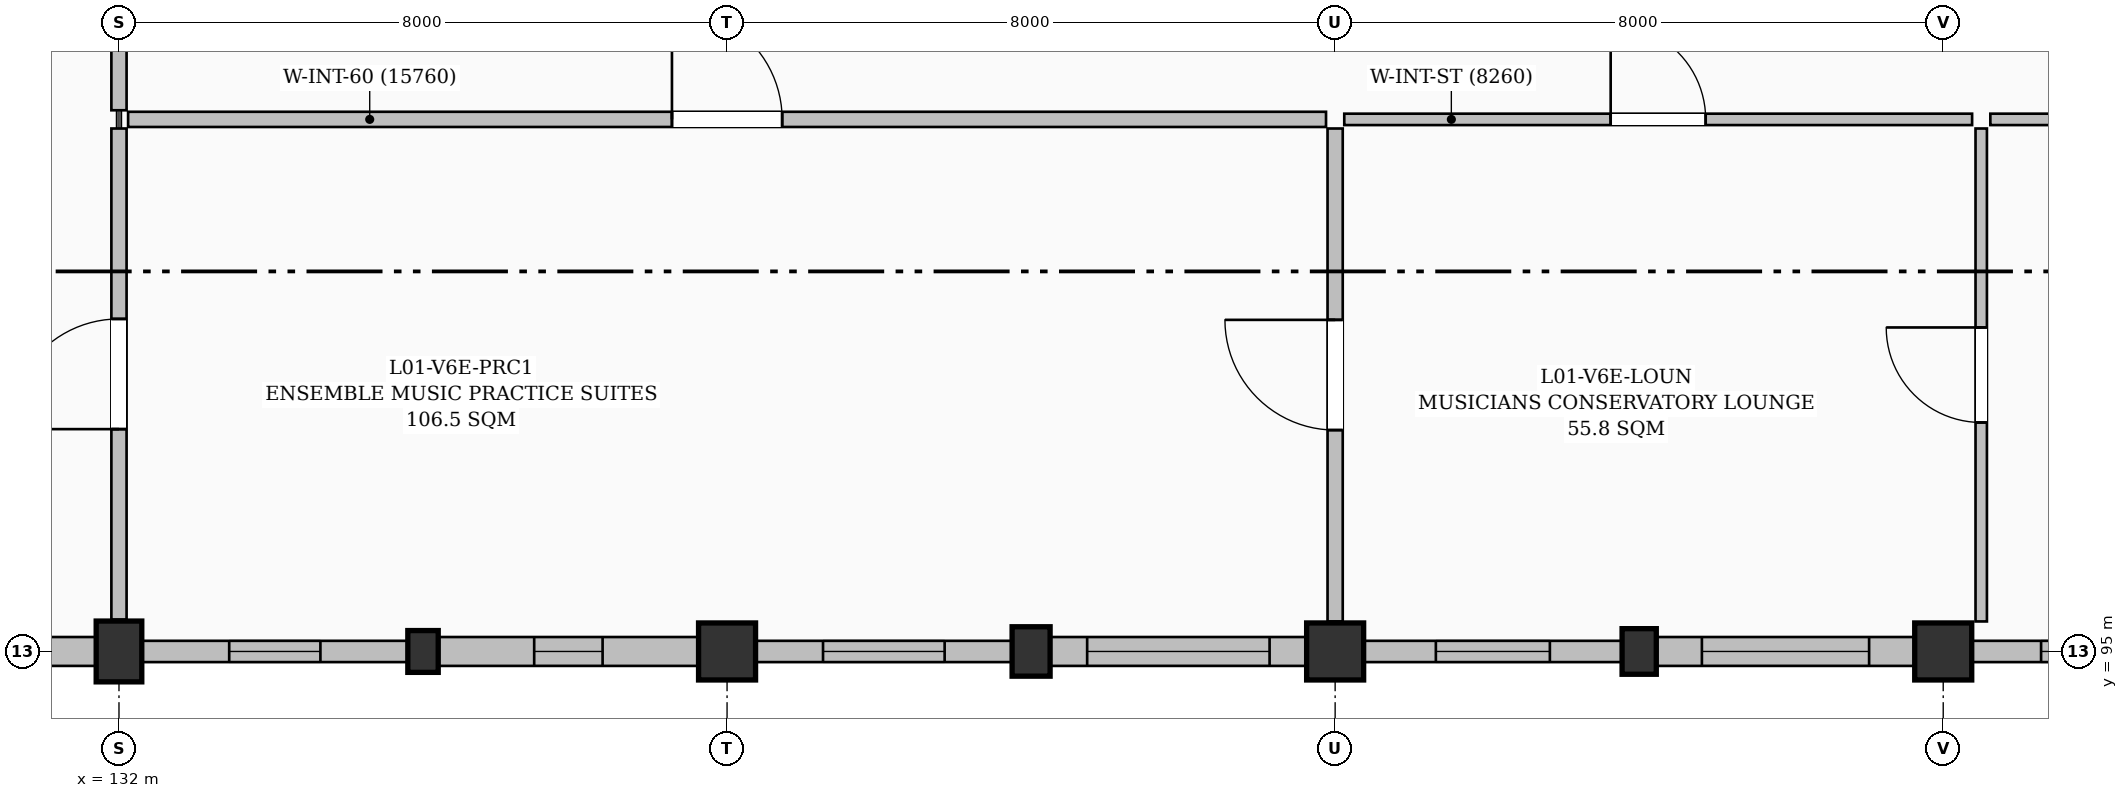
"""IFC4 building model, lengths in metres.
Left out: names, types, materials, properties, quantities, classifications, styles, units other than length and angle.
Written with IfcOpenShell. Run it as: python <this file> out.ifc"""

import sys

from ifc_helpers import new_model, si_unit, direction, frame, frame_2d, origin, origin_2d, place, context, subcontext, project, spatial, rectangle, extrude, element, fill, save


model = new_model("IFC4")
c1 = context("Model", 3, precision=1e-05, world=origin(), true_north=direction((0.0, 1.0)))
c2 = subcontext(c1, "Body", "Model", "MODEL_VIEW")
j1 = project(units=[si_unit("LENGTHUNIT", "METRE"), si_unit("PLANEANGLEUNIT", "RADIAN")], contexts=[c1])
p1 = place(None, origin())
s1 = spatial("IfcSite", under=j1, at=p1, CompositionType="ELEMENT")
p2 = place(p1, origin())
s2 = spatial("IfcBuilding", under=s1, at=p2, CompositionType="ELEMENT")
p3 = place(p2, frame((0.0, 0.0, 4.8)))
s3 = spatial("IfcBuildingStorey", under=s2, at=p3, CompositionType="ELEMENT", Elevation=4.8)
p4 = place(p3, frame((132.0, 95.0, 0.0), z_axis=(0.0, 0.0, 1.0), x_axis=(1.0, 0.0, 0.0)))
e1 = element("IfcColumn", 1, at=p4, inside=s3, PredefinedType="COLUMN", context=c2, shape_type="SweptSolid", body=[
    extrude(rectangle(XDim=0.6, YDim=0.8, at=origin_2d()), origin(), (0.0, 0.0, 1.0), 4.5),
])
p5 = place(p3, frame((136.0, 95.0, 0.0), z_axis=(0.0, 0.0, 1.0), x_axis=(1.0, 0.0, 0.0)))
e2 = element("IfcColumn", 2, at=p5, inside=s3, PredefinedType="PILASTER", context=c2, shape_type="SweptSolid", body=[
    extrude(rectangle(XDim=0.4, YDim=0.55, at=origin_2d()), origin(), (0.0, 0.0, 1.0), 4.5),
])
p6 = place(p3, frame((140.0, 95.0, 0.0), z_axis=(0.0, 0.0, 1.0), x_axis=(1.0, 0.0, 0.0)))
e3 = element("IfcColumn", 3, at=p6, inside=s3, PredefinedType="COLUMN", context=c2, shape_type="SweptSolid", body=[
    extrude(rectangle(XDim=0.75, YDim=0.75, at=origin_2d()), origin(), (0.0, 0.0, 1.0), 4.5),
])
p7 = place(p3, frame((144.0, 95.0, 0.0), z_axis=(0.0, 0.0, 1.0), x_axis=(1.0, 0.0, 0.0)))
e4 = element("IfcColumn", 4, at=p7, inside=s3, PredefinedType="PILASTER", context=c2, shape_type="SweptSolid", body=[
    extrude(rectangle(XDim=0.5, YDim=0.65, at=origin_2d()), origin(), (0.0, 0.0, 1.0), 4.5),
])
p8 = place(p3, frame((148.0, 95.0, 0.0), z_axis=(0.0, 0.0, 1.0), x_axis=(1.0, 0.0, 0.0)))
e5 = element("IfcColumn", 5, at=p8, inside=s3, PredefinedType="COLUMN", context=c2, shape_type="SweptSolid", body=[
    extrude(rectangle(XDim=0.75, YDim=0.75, at=origin_2d()), origin(), (0.0, 0.0, 1.0), 4.5),
])
p9 = place(p3, frame((152.0, 95.0, 0.0), z_axis=(0.0, 0.0, 1.0), x_axis=(1.0, 0.0, 0.0)))
e6 = element("IfcColumn", 6, at=p9, inside=s3, PredefinedType="PILASTER", context=c2, shape_type="SweptSolid", body=[
    extrude(rectangle(XDim=0.45, YDim=0.6, at=origin_2d()), origin(), (0.0, 0.0, 1.0), 4.5),
])
p10 = place(p3, frame((156.0, 95.0, 0.0), z_axis=(0.0, 0.0, 1.0), x_axis=(1.0, 0.0, 0.0)))
e7 = element("IfcColumn", 7, at=p10, inside=s3, PredefinedType="COLUMN", context=c2, shape_type="SweptSolid", body=[
    extrude(rectangle(XDim=0.75, YDim=0.75, at=origin_2d()), origin(), (0.0, 0.0, 1.0), 4.5),
])
p11 = place(p3, frame((159.8, 95.0, 0.0), z_axis=(0.0, 0.0, 1.0), x_axis=(-1.0, 0.0, 0.0)))
e8 = element("IfcWall", 8, at=p11, inside=s3, PredefinedType="SOLIDWALL", context=c2, shape_type="SweptSolid", body=[
    extrude(rectangle(XDim=3.425, YDim=0.28, at=frame_2d((1.712, 0.0))), origin(), (0.0, 0.0, 1.0), 3.685),
])
p12 = place(p11, frame((0.913, 0.0, 0.95)))
e9 = element("IfcOpeningElement", 9, at=p12, cuts=e8, PredefinedType="OPENING", context=c2, shape_type="SweptSolid", body=[
    extrude(rectangle(XDim=1.6, YDim=1.8, at=frame_2d((0.8, 0.9))), frame((0.0, 0.15, 0.0), z_axis=(0.0, -1.0, 0.0), x_axis=(1.0, 0.0, 0.0)), (0.0, 0.0, 1.0), 0.3),
])
p13 = place(p3, frame((155.625, 95.0, 0.0), z_axis=(0.0, 0.0, 1.0), x_axis=(-1.0, 0.0, 0.0)))
e10 = element("IfcWall", 10, at=p13, inside=s3, PredefinedType="SOLIDWALL", context=c2, shape_type="SweptSolid", body=[
    extrude(rectangle(XDim=3.4, YDim=0.38, at=frame_2d((1.7, 0.0))), origin(), (0.0, 0.0, 1.0), 3.735),
])
p14 = place(p13, frame((0.6, 0.0, 0.95)))
e11 = element("IfcOpeningElement", 11, at=p14, cuts=e10, PredefinedType="OPENING", context=c2, shape_type="SweptSolid", body=[
    extrude(rectangle(XDim=2.2, YDim=1.8, at=frame_2d((1.1, 0.9))), frame((0.0, 0.2, 0.0), z_axis=(0.0, -1.0, 0.0), x_axis=(1.0, 0.0, 0.0)), (0.0, 0.0, 1.0), 0.4),
])
p15 = place(p3, frame((151.775, 95.0, 0.0), z_axis=(0.0, 0.0, 1.0), x_axis=(-1.0, 0.0, 0.0)))
e12 = element("IfcWall", 12, at=p15, inside=s3, PredefinedType="SOLIDWALL", context=c2, shape_type="SweptSolid", body=[
    extrude(rectangle(XDim=3.4, YDim=0.28, at=frame_2d((1.7, 0.0))), origin(), (0.0, 0.0, 1.0), 3.735),
])
p16 = place(p15, frame((0.95, 0.0, 0.95)))
e13 = element("IfcOpeningElement", 13, at=p16, cuts=e12, PredefinedType="OPENING", context=c2, shape_type="SweptSolid", body=[
    extrude(rectangle(XDim=1.5, YDim=1.5, at=frame_2d((0.75, 0.75))), frame((0.0, 0.15, 0.0), z_axis=(0.0, -1.0, 0.0), x_axis=(1.0, 0.0, 0.0)), (0.0, 0.0, 1.0), 0.3),
])
p17 = place(p3, frame((147.625, 95.0, 0.0), z_axis=(0.0, 0.0, 1.0), x_axis=(-1.0, 0.0, 0.0)))
e14 = element("IfcWall", 14, at=p17, inside=s3, PredefinedType="SOLIDWALL", context=c2, shape_type="SweptSolid", body=[
    extrude(rectangle(XDim=3.375, YDim=0.38, at=frame_2d((1.688, 0.0))), origin(), (0.0, 0.0, 1.0), 3.935),
])
p18 = place(p17, frame((0.488, 0.0, 0.95)))
e15 = element("IfcOpeningElement", 15, at=p18, cuts=e14, PredefinedType="OPENING", context=c2, shape_type="SweptSolid", body=[
    extrude(rectangle(XDim=2.4, YDim=1.5, at=frame_2d((1.2, 0.75))), frame((0.0, 0.2, 0.0), z_axis=(0.0, -1.0, 0.0), x_axis=(1.0, 0.0, 0.0)), (0.0, 0.0, 1.0), 0.4),
])
p19 = place(p3, frame((143.75, 95.0, 0.0), z_axis=(0.0, 0.0, 1.0), x_axis=(-1.0, 0.0, 0.0)))
e16 = element("IfcWall", 16, at=p19, inside=s3, PredefinedType="SOLIDWALL", context=c2, shape_type="SweptSolid", body=[
    extrude(rectangle(XDim=3.375, YDim=0.28, at=frame_2d((1.688, 0.0))), origin(), (0.0, 0.0, 1.0), 3.935),
])
p20 = place(p19, frame((0.887, 0.0, 0.95)))
e17 = element("IfcOpeningElement", 17, at=p20, cuts=e16, PredefinedType="OPENING", context=c2, shape_type="SweptSolid", body=[
    extrude(rectangle(XDim=1.6, YDim=1.2, at=frame_2d((0.8, 0.6))), frame((0.0, 0.15, 0.0), z_axis=(0.0, -1.0, 0.0), x_axis=(1.0, 0.0, 0.0)), (0.0, 0.0, 1.0), 0.3),
])
p21 = place(p3, frame((139.625, 95.0, 0.0), z_axis=(0.0, 0.0, 1.0), x_axis=(-1.0, 0.0, 0.0)))
e18 = element("IfcWall", 18, at=p21, inside=s3, PredefinedType="SOLIDWALL", context=c2, shape_type="SweptSolid", body=[
    extrude(rectangle(XDim=3.425, YDim=0.38, at=frame_2d((1.712, 0.0))), origin(), (0.0, 0.0, 1.0), 3.635),
])
p22 = place(p21, frame((1.262, 0.0, 0.95)))
e19 = element("IfcOpeningElement", 19, at=p22, cuts=e18, PredefinedType="OPENING", context=c2, shape_type="SweptSolid", body=[
    extrude(rectangle(XDim=0.9, YDim=1.8, at=frame_2d((0.45, 0.9))), frame((0.0, 0.2, 0.0), z_axis=(0.0, -1.0, 0.0), x_axis=(1.0, 0.0, 0.0)), (0.0, 0.0, 1.0), 0.4),
])
p23 = place(p3, frame((135.8, 95.0, 0.0), z_axis=(0.0, 0.0, 1.0), x_axis=(-1.0, 0.0, 0.0)))
e20 = element("IfcWall", 20, at=p23, inside=s3, PredefinedType="SOLIDWALL", context=c2, shape_type="SweptSolid", body=[
    extrude(rectangle(XDim=3.5, YDim=0.28, at=frame_2d((1.75, 0.0))), origin(), (0.0, 0.0, 1.0), 3.635),
])
p24 = place(p23, frame((1.15, 0.0, 0.95)))
e21 = element("IfcOpeningElement", 21, at=p24, cuts=e20, PredefinedType="OPENING", context=c2, shape_type="SweptSolid", body=[
    extrude(rectangle(XDim=1.2, YDim=1.8, at=frame_2d((0.6, 0.9))), frame((0.0, 0.15, 0.0), z_axis=(0.0, -1.0, 0.0), x_axis=(1.0, 0.0, 0.0)), (0.0, 0.0, 1.0), 0.3),
])
p25 = place(p3, frame((131.7, 95.0, 0.0), z_axis=(0.0, 0.0, 1.0), x_axis=(-1.0, 0.0, 0.0)))
e22 = element("IfcWall", 22, at=p25, inside=s3, PredefinedType="SOLIDWALL", context=c2, shape_type="SweptSolid", body=[
    extrude(rectangle(XDim=3.475, YDim=0.38, at=frame_2d((1.737, 0.0))), origin(), (0.0, 0.0, 1.0), 3.685),
])
p26 = place(p25, frame((0.837, 0.0, 0.95)))
e23 = element("IfcOpeningElement", 23, at=p26, cuts=e22, PredefinedType="OPENING", context=c2, shape_type="SweptSolid", body=[
    extrude(rectangle(XDim=1.8, YDim=1.8, at=frame_2d((0.9, 0.9))), frame((0.0, 0.2, 0.0), z_axis=(0.0, -1.0, 0.0), x_axis=(1.0, 0.0, 0.0)), (0.0, 0.0, 1.0), 0.4),
])
p27 = place(p3, frame((132.0, 95.42, 0.0), z_axis=(0.0, 0.0, 1.0), x_axis=(0.0, 1.0, 0.0)))
e24 = element("IfcWall", 24, at=p27, inside=s3, PredefinedType="PARTITIONING", context=c2, shape_type="SweptSolid", body=[
    extrude(rectangle(XDim=6.46, YDim=0.2, at=frame_2d((3.23, 0.0))), origin(), (0.0, 0.0, 1.0), 3.785),
])
p28 = place(p27, frame((2.505, 0.0, 0.0)))
e25 = element("IfcOpeningElement", 25, at=p28, cuts=e24, PredefinedType="OPENING", context=c2, shape_type="SweptSolid", body=[
    extrude(rectangle(XDim=1.45, YDim=2.25, at=frame_2d((0.725, 1.125))), frame((0.0, 0.11, 0.0), z_axis=(0.0, -1.0, 0.0), x_axis=(1.0, 0.0, 0.0)), (0.0, 0.0, 1.0), 0.22),
])
p29 = place(p3, frame((132.0, 102.12, 0.0), z_axis=(0.0, 0.0, 1.0), x_axis=(0.0, 1.0, 0.0)))
e26 = element("IfcWall", 26, at=p29, inside=s3, PredefinedType="PARTITIONING", context=c2, shape_type="SweptSolid", body=[
    extrude(rectangle(XDim=2.36, YDim=0.2, at=frame_2d((1.18, 0.0))), origin(), (0.0, 0.0, 1.0), 3.785),
])
p30 = place(p3, frame((132.12, 102.0, 0.0), z_axis=(0.0, 0.0, 1.0), x_axis=(1.0, 0.0, 0.0)))
e27 = element("IfcWall", 27, at=p30, inside=s3, PredefinedType="PARTITIONING", context=c2, shape_type="SweptSolid", body=[
    extrude(rectangle(XDim=15.76, YDim=0.2, at=frame_2d((7.88, 0.0))), origin(), (0.0, 0.0, 1.0), 3.875),
])
p31 = place(p30, frame((7.155, 0.0, 0.0)))
e28 = element("IfcOpeningElement", 28, at=p31, cuts=e27, PredefinedType="OPENING", context=c2, shape_type="SweptSolid", body=[
    extrude(rectangle(XDim=1.45, YDim=2.25, at=frame_2d((0.725, 1.125))), frame((0.0, 0.11, 0.0), z_axis=(0.0, -1.0, 0.0), x_axis=(1.0, 0.0, 0.0)), (0.0, 0.0, 1.0), 0.22),
])
p32 = place(p3, frame((148.0, 95.395, 0.0), z_axis=(0.0, 0.0, 1.0), x_axis=(0.0, 1.0, 0.0)))
e29 = element("IfcWall", 29, at=p32, inside=s3, PredefinedType="PARTITIONING", context=c2, shape_type="SweptSolid", body=[
    extrude(rectangle(XDim=6.485, YDim=0.2, at=frame_2d((3.242, 0.0))), origin(), (0.0, 0.0, 1.0), 3.385),
])
p33 = place(p32, frame((2.518, 0.0, 0.0)))
e30 = element("IfcOpeningElement", 30, at=p33, cuts=e29, PredefinedType="OPENING", context=c2, shape_type="SweptSolid", body=[
    extrude(rectangle(XDim=1.45, YDim=2.25, at=frame_2d((0.725, 1.125))), frame((0.0, 0.11, 0.0), z_axis=(0.0, -1.0, 0.0), x_axis=(1.0, 0.0, 0.0)), (0.0, 0.0, 1.0), 0.22),
])
p34 = place(p3, frame((156.62, 102.0, 0.0), z_axis=(0.0, 0.0, 1.0), x_axis=(1.0, 0.0, 0.0)))
e31 = element("IfcWall", 31, at=p34, inside=s3, PredefinedType="PARTITIONING", context=c2, shape_type="SweptSolid", body=[
    extrude(rectangle(XDim=7.26, YDim=0.15, at=frame_2d((3.63, 0.0))), origin(), (0.0, 0.0, 1.0), 3.905),
])
p35 = place(p34, frame((3.005, 0.0, 0.0)))
e32 = element("IfcOpeningElement", 32, at=p35, cuts=e31, PredefinedType="OPENING", context=c2, shape_type="SweptSolid", body=[
    extrude(rectangle(XDim=1.25, YDim=2.15, at=frame_2d((0.625, 1.075))), frame((0.0, 0.085, 0.0), z_axis=(0.0, -1.0, 0.0), x_axis=(1.0, 0.0, 0.0)), (0.0, 0.0, 1.0), 0.17),
])
p36 = place(p3, frame((156.5, 95.395, 0.0), z_axis=(0.0, 0.0, 1.0), x_axis=(0.0, 1.0, 0.0)))
e33 = element("IfcWall", 33, at=p36, inside=s3, PredefinedType="PARTITIONING", context=c2, shape_type="SweptSolid", body=[
    extrude(rectangle(XDim=6.485, YDim=0.15, at=frame_2d((3.242, 0.0))), origin(), (0.0, 0.0, 1.0), 4.25),
])
p37 = place(p36, frame((2.617, 0.0, 0.0)))
e34 = element("IfcOpeningElement", 34, at=p37, cuts=e33, PredefinedType="OPENING", context=c2, shape_type="SweptSolid", body=[
    extrude(rectangle(XDim=1.25, YDim=2.15, at=frame_2d((0.625, 1.075))), frame((0.0, 0.085, 0.0), z_axis=(0.0, -1.0, 0.0), x_axis=(1.0, 0.0, 0.0)), (0.0, 0.0, 1.0), 0.17),
])
p38 = place(p3, frame((148.12, 102.0, 0.0), z_axis=(0.0, 0.0, 1.0), x_axis=(1.0, 0.0, 0.0)))
e35 = element("IfcWall", 35, at=p38, inside=s3, PredefinedType="PARTITIONING", context=c2, shape_type="SweptSolid", body=[
    extrude(rectangle(XDim=8.26, YDim=0.15, at=frame_2d((4.13, 0.0))), origin(), (0.0, 0.0, 1.0), 3.995),
])
p39 = place(p38, frame((3.505, 0.0, 0.0)))
e36 = element("IfcOpeningElement", 36, at=p39, cuts=e35, PredefinedType="OPENING", context=c2, shape_type="SweptSolid", body=[
    extrude(rectangle(XDim=1.25, YDim=2.15, at=frame_2d((0.625, 1.075))), frame((0.0, 0.085, 0.0), z_axis=(0.0, -1.0, 0.0), x_axis=(1.0, 0.0, 0.0)), (0.0, 0.0, 1.0), 0.17),
])
p40 = place(p12, origin())
e37 = element("IfcWindow", 37, at=p40, inside=s3, PartitioningType="DOUBLE_PANEL_VERTICAL", PredefinedType="WINDOW", context=c2, shape_type="SweptSolid", body=[
    extrude(rectangle(XDim=1.6, YDim=1.8, at=frame_2d((0.8, 0.9))), frame((0.0, 0.03, 0.0), z_axis=(0.0, -1.0, 0.0), x_axis=(1.0, 0.0, 0.0)), (0.0, 0.0, 1.0), 0.06),
])
fill(e9, e37)
p41 = place(p14, origin())
e38 = element("IfcWindow", 38, at=p41, inside=s3, PartitioningType="TRIPLE_PANEL_VERTICAL", PredefinedType="WINDOW", context=c2, shape_type="SweptSolid", body=[
    extrude(rectangle(XDim=2.2, YDim=1.8, at=frame_2d((1.1, 0.9))), frame((0.0, 0.03, 0.0), z_axis=(0.0, -1.0, 0.0), x_axis=(1.0, 0.0, 0.0)), (0.0, 0.0, 1.0), 0.06),
])
fill(e11, e38)
p42 = place(p16, origin())
e39 = element("IfcWindow", 39, at=p42, inside=s3, PartitioningType="DOUBLE_PANEL_VERTICAL", PredefinedType="WINDOW", context=c2, shape_type="SweptSolid", body=[
    extrude(rectangle(XDim=1.5, YDim=1.5, at=frame_2d((0.75, 0.75))), frame((0.0, 0.03, 0.0), z_axis=(0.0, -1.0, 0.0), x_axis=(1.0, 0.0, 0.0)), (0.0, 0.0, 1.0), 0.06),
])
fill(e13, e39)
p43 = place(p18, origin())
e40 = element("IfcWindow", 40, at=p43, inside=s3, PartitioningType="TRIPLE_PANEL_VERTICAL", PredefinedType="WINDOW", context=c2, shape_type="SweptSolid", body=[
    extrude(rectangle(XDim=2.4, YDim=1.5, at=frame_2d((1.2, 0.75))), frame((0.0, 0.03, 0.0), z_axis=(0.0, -1.0, 0.0), x_axis=(1.0, 0.0, 0.0)), (0.0, 0.0, 1.0), 0.06),
])
fill(e15, e40)
p44 = place(p20, origin())
e41 = element("IfcWindow", 41, at=p44, inside=s3, PartitioningType="DOUBLE_PANEL_HORIZONTAL", PredefinedType="WINDOW", context=c2, shape_type="SweptSolid", body=[
    extrude(rectangle(XDim=1.6, YDim=1.2, at=frame_2d((0.8, 0.6))), frame((0.0, 0.03, 0.0), z_axis=(0.0, -1.0, 0.0), x_axis=(1.0, 0.0, 0.0)), (0.0, 0.0, 1.0), 0.06),
])
fill(e17, e41)
p45 = place(p22, origin())
e42 = element("IfcWindow", 42, at=p45, inside=s3, PartitioningType="SINGLE_PANEL", PredefinedType="WINDOW", context=c2, shape_type="SweptSolid", body=[
    extrude(rectangle(XDim=0.9, YDim=1.8, at=frame_2d((0.45, 0.9))), frame((0.0, 0.03, 0.0), z_axis=(0.0, -1.0, 0.0), x_axis=(1.0, 0.0, 0.0)), (0.0, 0.0, 1.0), 0.06),
])
fill(e19, e42)
p46 = place(p24, origin())
e43 = element("IfcWindow", 43, at=p46, inside=s3, PartitioningType="SINGLE_PANEL", PredefinedType="WINDOW", context=c2, shape_type="SweptSolid", body=[
    extrude(rectangle(XDim=1.2, YDim=1.8, at=frame_2d((0.6, 0.9))), frame((0.0, 0.03, 0.0), z_axis=(0.0, -1.0, 0.0), x_axis=(1.0, 0.0, 0.0)), (0.0, 0.0, 1.0), 0.06),
])
fill(e21, e43)
p47 = place(p28, origin())
e44 = element("IfcDoor", 44, at=p47, inside=s3, OperationType="SINGLE_SWING_LEFT", PredefinedType="DOOR", context=c2, shape_type="SweptSolid", body=[
    extrude(rectangle(XDim=1.45, YDim=2.25, at=frame_2d((0.725, 1.125))), frame((0.0, 0.025, 0.0), z_axis=(0.0, -1.0, 0.0), x_axis=(1.0, 0.0, 0.0)), (0.0, 0.0, 1.0), 0.05),
])
fill(e25, e44)
p48 = place(p31, origin())
e45 = element("IfcDoor", 45, at=p48, inside=s3, OperationType="SINGLE_SWING_LEFT", PredefinedType="DOOR", context=c2, shape_type="SweptSolid", body=[
    extrude(rectangle(XDim=1.45, YDim=2.25, at=frame_2d((0.725, 1.125))), frame((0.0, 0.025, 0.0), z_axis=(0.0, -1.0, 0.0), x_axis=(1.0, 0.0, 0.0)), (0.0, 0.0, 1.0), 0.05),
])
fill(e28, e45)
p49 = place(p33, origin())
e46 = element("IfcDoor", 46, at=p49, inside=s3, OperationType="SINGLE_SWING_RIGHT", PredefinedType="DOOR", context=c2, shape_type="SweptSolid", body=[
    extrude(rectangle(XDim=1.45, YDim=2.25, at=frame_2d((0.725, 1.125))), frame((0.0, 0.025, 0.0), z_axis=(0.0, -1.0, 0.0), x_axis=(1.0, 0.0, 0.0)), (0.0, 0.0, 1.0), 0.05),
])
fill(e30, e46)
p50 = place(p37, origin())
e47 = element("IfcDoor", 47, at=p50, inside=s3, OperationType="SINGLE_SWING_RIGHT", PredefinedType="DOOR", context=c2, shape_type="SweptSolid", body=[
    extrude(rectangle(XDim=1.25, YDim=2.15, at=frame_2d((0.625, 1.075))), frame((0.0, 0.025, 0.0), z_axis=(0.0, -1.0, 0.0), x_axis=(1.0, 0.0, 0.0)), (0.0, 0.0, 1.0), 0.05),
])
fill(e34, e47)
p51 = place(p39, origin())
e48 = element("IfcDoor", 48, at=p51, inside=s3, OperationType="SINGLE_SWING_LEFT", PredefinedType="DOOR", context=c2, shape_type="SweptSolid", body=[
    extrude(rectangle(XDim=1.25, YDim=2.15, at=frame_2d((0.625, 1.075))), frame((0.0, 0.025, 0.0), z_axis=(0.0, -1.0, 0.0), x_axis=(1.0, 0.0, 0.0)), (0.0, 0.0, 1.0), 0.05),
])
fill(e36, e48)
save(model, sys.argv[1])
